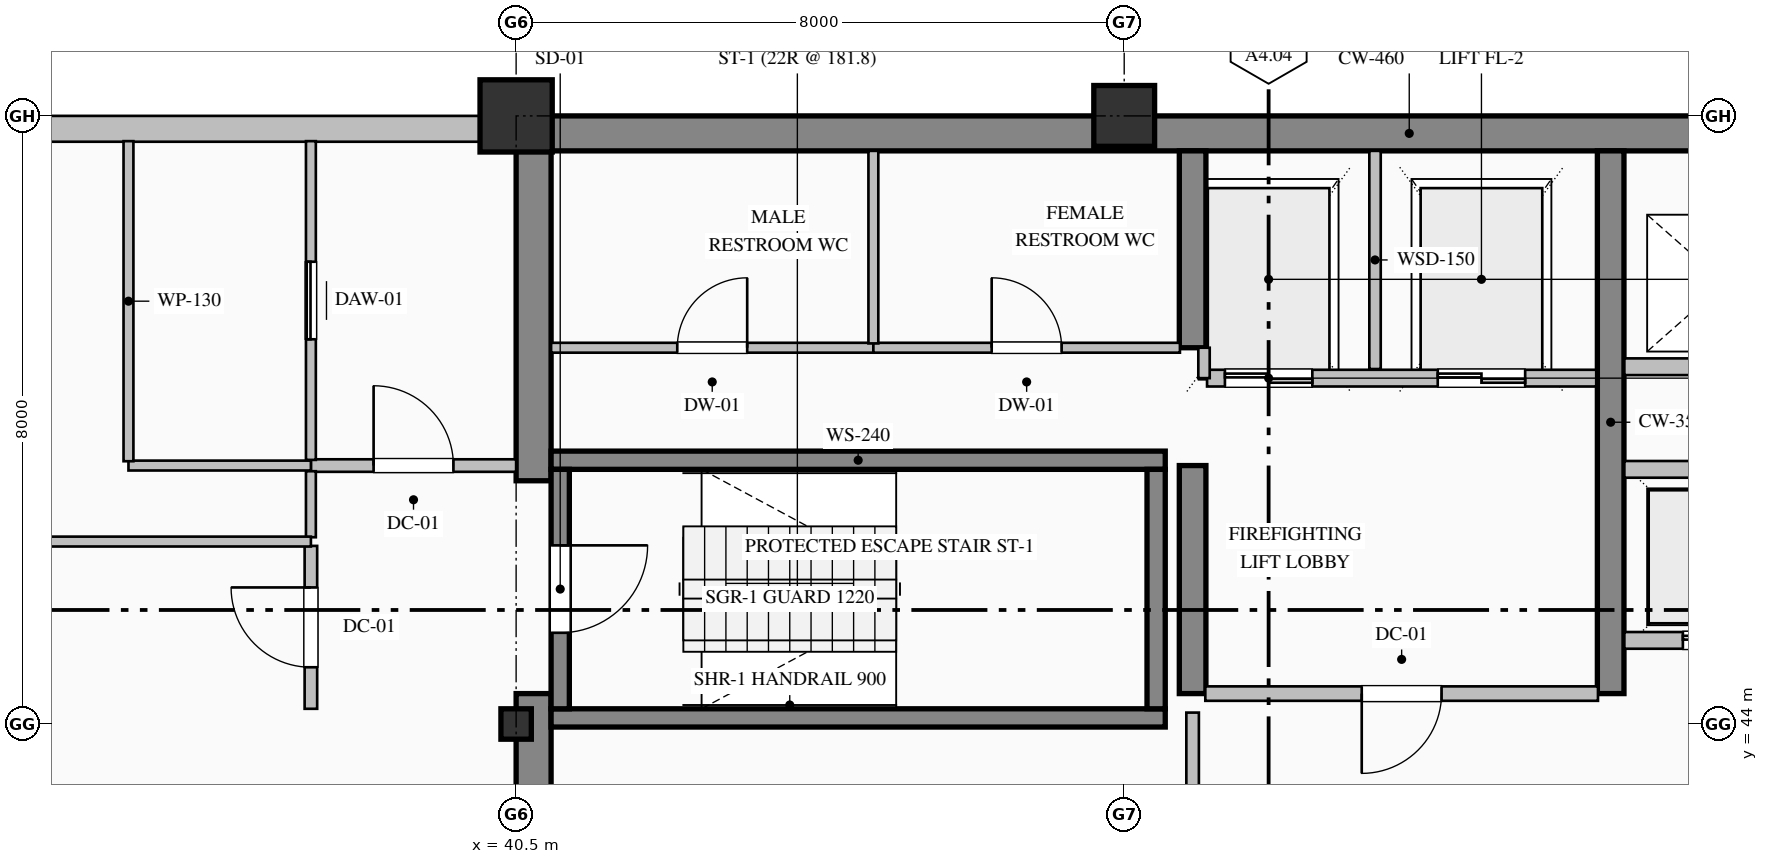
"""IFC4 building model, lengths in metres.
Left out: names, types, materials, properties, quantities, classifications, styles, units other than length and angle.
Written with IfcOpenShell. Run it as: python <this file> out.ifc"""

import sys

from ifc_helpers import new_model, si_unit, direction, frame, frame_2d, origin, origin_2d, place, context, subcontext, project, spatial, rectangle, hollow_rectangle, i_section, extrude, element, fill, save


model = new_model("IFC4")
c1 = context("Model", 3, precision=1e-05, world=origin(), true_north=direction((0.0, 1.0)))
c2 = subcontext(c1, "Body", "Model", "MODEL_VIEW")
j1 = project(units=[si_unit("LENGTHUNIT", "METRE"), si_unit("PLANEANGLEUNIT", "RADIAN")], contexts=[c1])
p1 = place(None, origin())
s1 = spatial("IfcSite", under=j1, at=p1, CompositionType="ELEMENT")
p2 = place(p1, origin())
s2 = spatial("IfcBuilding", under=s1, at=p2, CompositionType="ELEMENT")
p3 = place(p2, frame((0.0, 0.0, 217.8)))
s3 = spatial("IfcBuildingStorey", under=s2, at=p3, CompositionType="ELEMENT", Elevation=217.8)
p4 = place(p3, frame((40.5, 51.77, 0.0), z_axis=(0.0, 0.0, 1.0), x_axis=(1.0, 0.0, 0.0)))
e1 = element("IfcWall", 1, at=p4, inside=s3, PredefinedType="SHEAR", context=c2, shape_type="SweptSolid", body=[
    extrude(rectangle(XDim=23.5, YDim=0.46, at=frame_2d((11.75, 0.0))), origin(), (0.0, 0.0, 1.0), 3.775),
])
p5 = place(p3, frame((40.73, 36.46, 0.0), z_axis=(0.0, 0.0, 1.0), x_axis=(0.0, 1.0, 0.0)))
e2 = element("IfcWall", 2, at=p5, inside=s3, PredefinedType="SHEAR", context=c2, shape_type="SweptSolid", body=[
    extrude(rectangle(XDim=7.94, YDim=0.46, at=frame_2d((3.97, 0.0))), origin(), (0.0, 0.0, 1.0), 3.775),
])
p6 = place(p3, frame((40.73, 47.2, 0.0), z_axis=(0.0, 0.0, 1.0), x_axis=(0.0, 1.0, 0.0)))
e3 = element("IfcWall", 3, at=p6, inside=s3, PredefinedType="SHEAR", context=c2, shape_type="SweptSolid", body=[
    extrude(rectangle(XDim=4.34, YDim=0.46, at=frame_2d((2.17, 0.0))), origin(), (0.0, 0.0, 1.0), 3.775),
])
p7 = place(p3, frame((49.4, 44.4, 0.0), z_axis=(0.0, 0.0, 1.0), x_axis=(0.0, 1.0, 0.0)))
e4 = element("IfcWall", 4, at=p7, inside=s3, PredefinedType="SHEAR", context=c2, shape_type="SweptSolid", body=[
    extrude(rectangle(XDim=3.0, YDim=0.35, at=frame_2d((1.5, 0.0))), origin(), (0.0, 0.0, 1.0), 3.775),
])
p8 = place(p3, frame((49.4, 48.95, 0.0), z_axis=(0.0, 0.0, 1.0), x_axis=(0.0, 1.0, 0.0)))
e5 = element("IfcWall", 5, at=p8, inside=s3, PredefinedType="SHEAR", context=c2, shape_type="SweptSolid", body=[
    extrude(rectangle(XDim=2.59, YDim=0.35, at=frame_2d((1.295, 0.0))), origin(), (0.0, 0.0, 1.0), 3.775),
])
p9 = place(p3, frame((54.9, 44.4, 0.0), z_axis=(0.0, 0.0, 1.0), x_axis=(0.0, 1.0, 0.0)))
e6 = element("IfcWall", 6, at=p9, inside=s3, PredefinedType="SHEAR", context=c2, shape_type="SweptSolid", body=[
    extrude(rectangle(XDim=7.14, YDim=0.35, at=frame_2d((3.57, 0.0))), origin(), (0.0, 0.0, 1.0), 3.775),
])
p10 = place(p3, frame((40.5, 44.0, 0.0), z_axis=(0.0, 0.0, 1.0), x_axis=(1.0, 0.0, 0.0)))
e7 = element("IfcColumn", 7, at=p10, inside=s3, PredefinedType="COLUMN", context=c2, shape_type="SweptSolid", body=[
    extrude(i_section(OverallWidth=0.4, OverallDepth=0.4, WebThickness=0.013, FlangeThickness=0.021, FilletRadius=0.022, at=origin_2d()), origin(), (0.0, 0.0, 1.0), 4.0),
])
p11 = place(p3, frame((40.5, 52.0, 0.0), z_axis=(0.0, 0.0, 1.0), x_axis=(1.0, 0.0, 0.0)))
e8 = element("IfcColumn", 8, at=p11, inside=s3, PredefinedType="COLUMN", context=c2, shape_type="SweptSolid", body=[
    extrude(hollow_rectangle(XDim=0.95, YDim=0.95, WallThickness=0.036, at=origin_2d()), origin(), (0.0, 0.0, 1.0), 4.0),
])
p12 = place(p3, frame((48.5, 52.0, 0.0), z_axis=(0.0, 0.0, 1.0), x_axis=(1.0, 0.0, 0.0)))
e9 = element("IfcColumn", 9, at=p12, inside=s3, PredefinedType="COLUMN", context=c2, shape_type="SweptSolid", body=[
    extrude(hollow_rectangle(XDim=0.8, YDim=0.8, WallThickness=0.032, at=origin_2d()), origin(), (0.0, 0.0, 1.0), 4.0),
])
p13 = place(p3, frame((13.0, 51.83, 0.0), z_axis=(0.0, 0.0, 1.0), x_axis=(1.0, 0.0, 0.0)))
e10 = element("IfcWall", 10, at=p13, inside=s3, PredefinedType="SOLIDWALL", context=c2, shape_type="SweptSolid", body=[
    extrude(rectangle(XDim=27.52, YDim=0.34, at=frame_2d((13.76, 0.0))), origin(), (0.0, 0.0, 1.0), 3.325),
])
p14 = place(p13, frame((6.525, 0.0, 0.9)))
e11 = element("IfcOpeningElement", 11, at=p14, cuts=e10, PredefinedType="OPENING", context=c2, shape_type="SweptSolid", body=[
    extrude(rectangle(XDim=1.35, YDim=1.85, at=frame_2d((0.675, 0.925))), frame((0.0, 0.18, 0.0), z_axis=(0.0, -1.0, 0.0), x_axis=(1.0, 0.0, 0.0)), (0.0, 0.0, 1.0), 0.36),
])
for number, where, z_axis, x_axis in (
    (12, (40.96, 47.47, 0.0), (0.0, 0.0, 1.0), (1.0, 0.0, 0.0)),
    (13, (49.04, 44.08, 0.0), (0.0, 0.0, 1.0), (-1.0, 0.0, 0.0)),
):
    element("IfcWall", number, at=place(p3, frame(where, z_axis=z_axis, x_axis=x_axis)), inside=s3, PredefinedType="SOLIDWALL", context=c2, shape_type="SweptSolid", body=[
        extrude(rectangle(XDim=8.08, YDim=0.24, at=frame_2d((4.04, 0.0))), origin(), (0.0, 0.0, 1.0), 4.0),
    ])
p15 = place(p3, frame((41.08, 47.35, 0.0), z_axis=(0.0, 0.0, 1.0), x_axis=(0.0, -1.0, 0.0)))
e14 = element("IfcWall", 14, at=p15, inside=s3, PredefinedType="SOLIDWALL", context=c2, shape_type="SweptSolid", body=[
    extrude(rectangle(XDim=3.15, YDim=0.24, at=frame_2d((1.575, 0.0))), origin(), (0.0, 0.0, 1.0), 4.0),
])
p16 = place(p15, frame((1.0, 0.0, 0.0)))
e15 = element("IfcOpeningElement", 15, at=p16, cuts=e14, PredefinedType="OPENING", context=c2, shape_type="SweptSolid", body=[
    extrude(rectangle(XDim=1.15, YDim=2.2, at=frame_2d((0.575, 1.1))), frame((0.0, 0.13, 0.0), z_axis=(0.0, -1.0, 0.0), x_axis=(1.0, 0.0, 0.0)), (0.0, 0.0, 1.0), 0.26),
])
p17 = place(p3, frame((48.92, 44.2, 0.0), z_axis=(0.0, 0.0, 1.0), x_axis=(0.0, 1.0, 0.0)))
e16 = element("IfcWall", 16, at=p17, inside=s3, PredefinedType="SOLIDWALL", context=c2, shape_type="SweptSolid", body=[
    extrude(rectangle(XDim=3.15, YDim=0.24, at=frame_2d((1.575, 0.0))), origin(), (0.0, 0.0, 1.0), 4.0),
])
p18 = place(p3, frame((54.71, 48.55, 0.0), z_axis=(0.0, 0.0, 1.0), x_axis=(-1.0, 0.0, 0.0)))
e17 = element("IfcWall", 17, at=p18, inside=s3, PredefinedType="PARTITIONING", context=c2, shape_type="SweptSolid", body=[
    extrude(rectangle(XDim=5.12, YDim=0.22, at=frame_2d((2.56, 0.0))), origin(), (0.0, 0.0, 1.0), 3.775),
])
p19 = place(p18, frame((3.735, 0.0, 0.0)))
e18 = element("IfcOpeningElement", 18, at=p19, cuts=e17, PredefinedType="OPENING", context=c2, shape_type="SweptSolid", body=[
    extrude(rectangle(XDim=1.15, YDim=2.2, at=frame_2d((0.575, 1.1))), frame((0.0, 0.12, 0.0), z_axis=(0.0, -1.0, 0.0), x_axis=(1.0, 0.0, 0.0)), (0.0, 0.0, 1.0), 0.24),
])
p20 = place(p18, frame((0.935, 0.0, 0.0)))
e19 = element("IfcOpeningElement", 19, at=p20, cuts=e17, PredefinedType="OPENING", context=c2, shape_type="SweptSolid", body=[
    extrude(rectangle(XDim=1.15, YDim=2.2, at=frame_2d((0.575, 1.1))), frame((0.0, 0.12, 0.0), z_axis=(0.0, -1.0, 0.0), x_axis=(1.0, 0.0, 0.0)), (0.0, 0.0, 1.0), 0.24),
])
p21 = place(p3, frame((51.8, 48.67, 0.0), z_axis=(0.0, 0.0, 1.0), x_axis=(0.0, 1.0, 0.0)))
e20 = element("IfcWall", 20, at=p21, inside=s3, PredefinedType="PARTITIONING", context=c2, shape_type="SweptSolid", body=[
    extrude(rectangle(XDim=2.87, YDim=0.15, at=frame_2d((1.435, 0.0))), origin(), (0.0, 0.0, 1.0), 3.775),
])
p22 = place(p3, frame((49.55, 48.55, 0.0), z_axis=(0.0, 0.0, 1.0), x_axis=(0.0, 1.0, 0.0)))
e21 = element("IfcWall", 21, at=p22, inside=s3, PredefinedType="PARTITIONING", context=c2, shape_type="SweptSolid", body=[
    extrude(rectangle(XDim=0.4, YDim=0.15, at=frame_2d((0.2, 0.0))), origin(), (0.0, 0.0, 1.0), 3.775),
])
p23 = place(p3, frame((63.32, 45.1, 0.0), z_axis=(0.0, 0.0, 1.0), x_axis=(-1.0, 0.0, 0.0)))
e22 = element("IfcWall", 22, at=p23, inside=s3, PredefinedType="PARTITIONING", context=c2, shape_type="SweptSolid", body=[
    extrude(rectangle(XDim=8.24, YDim=0.22, at=frame_2d((4.12, 0.0))), origin(), (0.0, 0.0, 1.0), 3.775),
])
p24 = place(p23, frame((6.37, 0.0, 0.0)))
e23 = element("IfcOpeningElement", 23, at=p24, cuts=e22, PredefinedType="OPENING", context=c2, shape_type="SweptSolid", body=[
    extrude(rectangle(XDim=1.1, YDim=2.2, at=frame_2d((0.55, 1.1))), frame((0.0, 0.12, 0.0), z_axis=(0.0, -1.0, 0.0), x_axis=(1.0, 0.0, 0.0)), (0.0, 0.0, 1.0), 0.24),
])
p25 = place(p23, frame((3.57, 0.0, 0.0)))
e24 = element("IfcOpeningElement", 24, at=p25, cuts=e22, PredefinedType="OPENING", context=c2, shape_type="SweptSolid", body=[
    extrude(rectangle(XDim=1.1, YDim=2.2, at=frame_2d((0.55, 1.1))), frame((0.0, 0.12, 0.0), z_axis=(0.0, -1.0, 0.0), x_axis=(1.0, 0.0, 0.0)), (0.0, 0.0, 1.0), 0.24),
])
p26 = place(p23, frame((0.77, 0.0, 0.0)))
e25 = element("IfcOpeningElement", 25, at=p26, cuts=e22, PredefinedType="OPENING", context=c2, shape_type="SweptSolid", body=[
    extrude(rectangle(XDim=1.1, YDim=2.2, at=frame_2d((0.55, 1.1))), frame((0.0, 0.12, 0.0), z_axis=(0.0, -1.0, 0.0), x_axis=(1.0, 0.0, 0.0)), (0.0, 0.0, 1.0), 0.24),
])
for number, where, z_axis, x_axis in (
    (26, (55.08, 47.35, 0.0), (0.0, 0.0, 1.0), (1.0, 0.0, 0.0)),
    (27, (63.32, 48.7, 0.0), (0.0, 0.0, 1.0), (-1.0, 0.0, 0.0)),
):
    element("IfcWall", number, at=place(p3, frame(where, z_axis=z_axis, x_axis=x_axis)), inside=s3, PredefinedType="PARTITIONING", context=c2, shape_type="SweptSolid", body=[
        extrude(rectangle(XDim=8.24, YDim=0.22, at=frame_2d((4.12, 0.0))), origin(), (0.0, 0.0, 1.0), 3.775),
    ])
p27 = place(p3, frame((37.8, 47.4, 0.0), z_axis=(0.0, 0.0, 1.0), x_axis=(1.0, 0.0, 0.0)))
e28 = element("IfcWall", 28, at=p27, inside=s3, PredefinedType="PARTITIONING", context=c2, shape_type="SweptSolid", body=[
    extrude(rectangle(XDim=2.7, YDim=0.165, at=frame_2d((1.35, 0.0))), origin(), (0.0, 0.0, 1.0), 3.775),
])
p28 = place(p27, frame((0.825, 0.0, 0.0)))
e29 = element("IfcOpeningElement", 29, at=p28, cuts=e28, PredefinedType="OPENING", context=c2, shape_type="SweptSolid", body=[
    extrude(rectangle(XDim=1.05, YDim=2.15, at=frame_2d((0.525, 1.075))), frame((0.0, 0.093, 0.0), z_axis=(0.0, -1.0, 0.0), x_axis=(1.0, 0.0, 0.0)), (0.0, 0.0, 1.0), 0.185),
])
p29 = place(p3, frame((37.8, 44.2, 0.0), z_axis=(0.0, 0.0, 1.0), x_axis=(0.0, 1.0, 0.0)))
e30 = element("IfcWall", 30, at=p29, inside=s3, PredefinedType="PARTITIONING", context=c2, shape_type="SweptSolid", body=[
    extrude(rectangle(XDim=2.143, YDim=0.165, at=frame_2d((1.072, 0.0))), origin(), (0.0, 0.0, 1.0), 3.775),
])
p30 = place(p29, frame((0.546, 0.0, 0.0)))
e31 = element("IfcOpeningElement", 31, at=p30, cuts=e30, PredefinedType="OPENING", context=c2, shape_type="SweptSolid", body=[
    extrude(rectangle(XDim=1.05, YDim=2.15, at=frame_2d((0.525, 1.075))), frame((0.0, 0.093, 0.0), z_axis=(0.0, -1.0, 0.0), x_axis=(1.0, 0.0, 0.0)), (0.0, 0.0, 1.0), 0.185),
])
p31 = place(p3, frame((37.8, 46.457, 0.0), z_axis=(0.0, 0.0, 1.0), x_axis=(0.0, 1.0, 0.0)))
e32 = element("IfcWall", 32, at=p31, inside=s3, PredefinedType="PARTITIONING", context=c2, shape_type="SweptSolid", body=[
    extrude(rectangle(XDim=0.868, YDim=0.13, at=frame_2d((0.434, 0.0))), origin(), (0.0, 0.0, 1.0), 3.775),
])
p32 = place(p3, frame((37.8, 47.475, 0.0), z_axis=(0.0, 0.0, 1.0), x_axis=(0.0, 1.0, 0.0)))
e33 = element("IfcWall", 33, at=p32, inside=s3, PredefinedType="PARTITIONING", context=c2, shape_type="SweptSolid", body=[
    extrude(rectangle(XDim=4.193, YDim=0.13, at=frame_2d((2.097, 0.0))), origin(), (0.0, 0.0, 1.0), 3.775),
])
p33 = place(p32, frame((1.587, 0.0, 0.0)))
e34 = element("IfcOpeningElement", 34, at=p33, cuts=e33, PredefinedType="OPENING", context=c2, shape_type="SweptSolid", body=[
    extrude(rectangle(XDim=1.02, YDim=2.15, at=frame_2d((0.51, 1.075))), frame((0.0, 0.075, 0.0), z_axis=(0.0, -1.0, 0.0), x_axis=(1.0, 0.0, 0.0)), (0.0, 0.0, 1.0), 0.15),
])
p34 = place(p3, frame((37.8, 47.4, 0.0), z_axis=(0.0, 0.0, 1.0), x_axis=(-1.0, 0.0, 0.0)))
e35 = element("IfcWall", 35, at=p34, inside=s3, PredefinedType="PARTITIONING", context=c2, shape_type="SweptSolid", body=[
    extrude(rectangle(XDim=2.4, YDim=0.13, at=frame_2d((1.2, 0.0))), origin(), (0.0, 0.0, 1.0), 3.775),
])
p35 = place(p3, frame((35.4, 47.457, 0.0), z_axis=(0.0, 0.0, 1.0), x_axis=(0.0, 1.0, 0.0)))
e36 = element("IfcWall", 36, at=p35, inside=s3, PredefinedType="PARTITIONING", context=c2, shape_type="SweptSolid", body=[
    extrude(rectangle(XDim=4.211, YDim=0.13, at=frame_2d((2.105, 0.0))), origin(), (0.0, 0.0, 1.0), 3.775),
])
p36 = place(p3, frame((40.96, 48.95, 0.0), z_axis=(0.0, 0.0, 1.0), x_axis=(1.0, 0.0, 0.0)))
e37 = element("IfcWall", 37, at=p36, inside=s3, PredefinedType="PARTITIONING", context=c2, shape_type="SweptSolid", body=[
    extrude(rectangle(XDim=4.24, YDim=0.13, at=frame_2d((2.12, 0.0))), origin(), (0.0, 0.0, 1.0), 3.775),
])
p37 = place(p36, frame((1.66, 0.0, 0.0)))
e38 = element("IfcOpeningElement", 38, at=p37, cuts=e37, PredefinedType="OPENING", context=c2, shape_type="SweptSolid", body=[
    extrude(rectangle(XDim=0.92, YDim=2.15, at=frame_2d((0.46, 1.075))), frame((0.0, 0.075, 0.0), z_axis=(0.0, -1.0, 0.0), x_axis=(1.0, 0.0, 0.0)), (0.0, 0.0, 1.0), 0.15),
])
p38 = place(p3, frame((45.2, 48.95, 0.0), z_axis=(0.0, 0.0, 1.0), x_axis=(1.0, 0.0, 0.0)))
e39 = element("IfcWall", 39, at=p38, inside=s3, PredefinedType="PARTITIONING", context=c2, shape_type="SweptSolid", body=[
    extrude(rectangle(XDim=4.033, YDim=0.13, at=frame_2d((2.017, 0.0))), origin(), (0.0, 0.0, 1.0), 3.775),
])
p39 = place(p38, frame((1.556, 0.0, 0.0)))
e40 = element("IfcOpeningElement", 40, at=p39, cuts=e39, PredefinedType="OPENING", context=c2, shape_type="SweptSolid", body=[
    extrude(rectangle(XDim=0.92, YDim=2.15, at=frame_2d((0.46, 1.075))), frame((0.0, 0.075, 0.0), z_axis=(0.0, -1.0, 0.0), x_axis=(1.0, 0.0, 0.0)), (0.0, 0.0, 1.0), 0.15),
])
p40 = place(p3, frame((54.733, 44.4, 0.0), z_axis=(0.0, 0.0, 1.0), x_axis=(-1.0, 0.0, 0.0)))
e41 = element("IfcWall", 41, at=p40, inside=s3, PredefinedType="PARTITIONING", context=c2, shape_type="SweptSolid", body=[
    extrude(rectangle(XDim=5.166, YDim=0.19, at=frame_2d((2.583, 0.0))), origin(), (0.0, 0.0, 1.0), 3.775),
])
p41 = place(p40, frame((2.058, 0.0, 0.0)))
e42 = element("IfcOpeningElement", 42, at=p41, cuts=e41, PredefinedType="OPENING", context=c2, shape_type="SweptSolid", body=[
    extrude(rectangle(XDim=1.05, YDim=2.15, at=frame_2d((0.525, 1.075))), frame((0.0, 0.105, 0.0), z_axis=(0.0, -1.0, 0.0), x_axis=(1.0, 0.0, 0.0)), (0.0, 0.0, 1.0), 0.21),
])
p42 = place(p3, frame((49.4, 36.46, 0.0), z_axis=(0.0, 0.0, 1.0), x_axis=(0.0, 1.0, 0.0)))
e43 = element("IfcWall", 43, at=p42, inside=s3, PredefinedType="PARTITIONING", context=c2, shape_type="SweptSolid", body=[
    extrude(rectangle(XDim=7.69, YDim=0.165, at=frame_2d((3.845, 0.0))), origin(), (0.0, 0.0, 1.0), 3.017),
])
p43 = place(p42, frame((3.345, 0.0, 0.0)))
e44 = element("IfcOpeningElement", 44, at=p43, cuts=e43, PredefinedType="OPENING", context=c2, shape_type="SweptSolid", body=[
    extrude(rectangle(XDim=1.0, YDim=2.15, at=frame_2d((0.5, 1.075))), frame((0.0, 0.093, 0.0), z_axis=(0.0, -1.0, 0.0), x_axis=(1.0, 0.0, 0.0)), (0.0, 0.0, 1.0), 0.185),
])
p44 = place(p3, frame((45.2, 51.54, 0.0), z_axis=(0.0, 0.0, 1.0), x_axis=(0.0, -1.0, 0.0)))
e45 = element("IfcWall", 45, at=p44, inside=s3, PredefinedType="PARTITIONING", context=c2, shape_type="SweptSolid", body=[
    extrude(rectangle(XDim=2.533, YDim=0.13, at=frame_2d((1.267, 0.0))), origin(), (0.0, 0.0, 1.0), 3.775),
])
p45 = place(p3, frame((29.6, 46.4, 0.0), z_axis=(0.0, 0.0, 1.0), x_axis=(1.0, 0.0, 0.0)))
e46 = element("IfcWall", 46, at=p45, inside=s3, PredefinedType="PARTITIONING", context=c2, shape_type="SweptSolid", body=[
    extrude(rectangle(XDim=8.2, YDim=0.13, at=frame_2d((4.1, 0.0))), origin(), (0.0, 0.0, 1.0), 3.775),
])
p46 = place(p45, frame((3.6, 0.0, 0.0)))
e47 = element("IfcOpeningElement", 47, at=p46, cuts=e46, PredefinedType="OPENING", context=c2, shape_type="SweptSolid", body=[
    extrude(rectangle(XDim=1.0, YDim=2.15, at=frame_2d((0.5, 1.075))), frame((0.0, 0.075, 0.0), z_axis=(0.0, -1.0, 0.0), x_axis=(1.0, 0.0, 0.0)), (0.0, 0.0, 1.0), 0.15),
])
p47 = place(p16, origin())
e48 = element("IfcDoor", 48, at=p47, inside=s3, OperationType="SINGLE_SWING_LEFT", PredefinedType="DOOR", context=c2, shape_type="SweptSolid", body=[
    extrude(rectangle(XDim=1.15, YDim=2.2, at=frame_2d((0.575, 1.1))), frame((0.0, 0.025, 0.0), z_axis=(0.0, -1.0, 0.0), x_axis=(1.0, 0.0, 0.0)), (0.0, 0.0, 1.0), 0.05),
])
fill(e15, e48)
p48 = place(p19, origin())
e49 = element("IfcDoor", 49, at=p48, inside=s3, OperationType="DOUBLE_DOOR_SLIDING", PredefinedType="DOOR", context=c2, shape_type="SweptSolid", body=[
    extrude(rectangle(XDim=1.15, YDim=2.2, at=frame_2d((0.575, 1.1))), frame((0.0, 0.025, 0.0), z_axis=(0.0, -1.0, 0.0), x_axis=(1.0, 0.0, 0.0)), (0.0, 0.0, 1.0), 0.05),
])
fill(e18, e49)
p49 = place(p20, origin())
e50 = element("IfcDoor", 50, at=p49, inside=s3, OperationType="DOUBLE_DOOR_SLIDING", PredefinedType="DOOR", context=c2, shape_type="SweptSolid", body=[
    extrude(rectangle(XDim=1.15, YDim=2.2, at=frame_2d((0.575, 1.1))), frame((0.0, 0.025, 0.0), z_axis=(0.0, -1.0, 0.0), x_axis=(1.0, 0.0, 0.0)), (0.0, 0.0, 1.0), 0.05),
])
fill(e19, e50)
p50 = place(p24, origin())
e51 = element("IfcDoor", 51, at=p50, inside=s3, OperationType="DOUBLE_DOOR_SLIDING", PredefinedType="DOOR", context=c2, shape_type="SweptSolid", body=[
    extrude(rectangle(XDim=1.1, YDim=2.2, at=frame_2d((0.55, 1.1))), frame((0.0, 0.025, 0.0), z_axis=(0.0, -1.0, 0.0), x_axis=(1.0, 0.0, 0.0)), (0.0, 0.0, 1.0), 0.05),
])
fill(e23, e51)
p51 = place(p41, origin())
e52 = element("IfcDoor", 52, at=p51, inside=s3, OperationType="SINGLE_SWING_RIGHT", PredefinedType="DOOR", context=c2, shape_type="SweptSolid", body=[
    extrude(rectangle(XDim=1.05, YDim=2.15, at=frame_2d((0.525, 1.075))), frame((0.0, 0.025, 0.0), z_axis=(0.0, -1.0, 0.0), x_axis=(1.0, 0.0, 0.0)), (0.0, 0.0, 1.0), 0.05),
])
fill(e42, e52)
p52 = place(p28, origin())
e53 = element("IfcDoor", 53, at=p52, inside=s3, OperationType="SINGLE_SWING_LEFT", PredefinedType="DOOR", context=c2, shape_type="SweptSolid", body=[
    extrude(rectangle(XDim=1.05, YDim=2.15, at=frame_2d((0.525, 1.075))), frame((0.0, 0.025, 0.0), z_axis=(0.0, -1.0, 0.0), x_axis=(1.0, 0.0, 0.0)), (0.0, 0.0, 1.0), 0.05),
])
fill(e29, e53)
p53 = place(p30, origin())
e54 = element("IfcDoor", 54, at=p53, inside=s3, OperationType="SINGLE_SWING_RIGHT", PredefinedType="DOOR", context=c2, shape_type="SweptSolid", body=[
    extrude(rectangle(XDim=1.05, YDim=2.15, at=frame_2d((0.525, 1.075))), frame((0.0, 0.025, 0.0), z_axis=(0.0, -1.0, 0.0), x_axis=(1.0, 0.0, 0.0)), (0.0, 0.0, 1.0), 0.05),
])
fill(e31, e54)
p54 = place(p33, origin())
e55 = element("IfcDoor", 55, at=p54, inside=s3, OperationType="SLIDING_TO_LEFT", PredefinedType="DOOR", context=c2, shape_type="SweptSolid", body=[
    extrude(rectangle(XDim=1.02, YDim=2.15, at=frame_2d((0.51, 1.075))), frame((0.0, 0.025, 0.0), z_axis=(0.0, -1.0, 0.0), x_axis=(1.0, 0.0, 0.0)), (0.0, 0.0, 1.0), 0.05),
])
fill(e34, e55)
p55 = place(p37, origin())
e56 = element("IfcDoor", 56, at=p55, inside=s3, OperationType="SINGLE_SWING_RIGHT", PredefinedType="DOOR", context=c2, shape_type="SweptSolid", body=[
    extrude(rectangle(XDim=0.92, YDim=2.15, at=frame_2d((0.46, 1.075))), frame((0.0, 0.025, 0.0), z_axis=(0.0, -1.0, 0.0), x_axis=(1.0, 0.0, 0.0)), (0.0, 0.0, 1.0), 0.05),
])
fill(e38, e56)
p56 = place(p39, origin())
e57 = element("IfcDoor", 57, at=p56, inside=s3, OperationType="SINGLE_SWING_LEFT", PredefinedType="DOOR", context=c2, shape_type="SweptSolid", body=[
    extrude(rectangle(XDim=0.92, YDim=2.15, at=frame_2d((0.46, 1.075))), frame((0.0, 0.025, 0.0), z_axis=(0.0, -1.0, 0.0), x_axis=(1.0, 0.0, 0.0)), (0.0, 0.0, 1.0), 0.05),
])
fill(e40, e57)
save(model, sys.argv[1])
